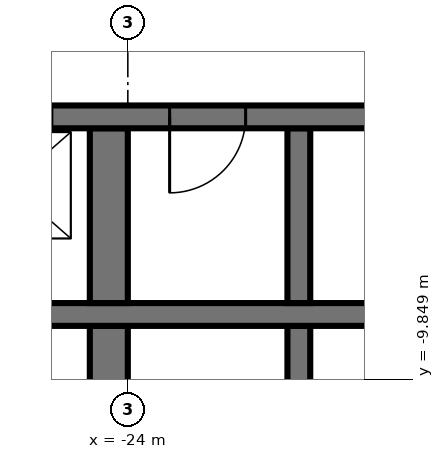
"""IFC4 building model, lengths in metres.
Left out: names, types, materials, properties, quantities, classifications, styles, units other than length and angle.
Written with IfcOpenShell. Run it as: python <this file> out.ifc"""

import sys

from ifc_helpers import new_model, si_unit, direction, frame, frame_2d, origin, place, context, subcontext, project, spatial, rectangle, extrude, element, fill, save


model = new_model("IFC4")
c1 = context("Model", 3, precision=1e-05, world=origin(), true_north=direction((0.0, 1.0)))
c2 = subcontext(c1, "Body", "Model", "MODEL_VIEW")
j1 = project(units=[si_unit("LENGTHUNIT", "METRE"), si_unit("PLANEANGLEUNIT", "RADIAN")], contexts=[c1])
p1 = place(None, origin())
s1 = spatial("IfcSite", under=j1, at=p1, CompositionType="ELEMENT")
p2 = place(p1, origin())
s2 = spatial("IfcBuilding", under=s1, at=p2, CompositionType="ELEMENT")
p3 = place(p2, frame((0.0, 0.0, 45.6)))
s3 = spatial("IfcBuildingStorey", under=s2, at=p3, CompositionType="ELEMENT", Elevation=45.6)
p4 = place(p3, frame((-29.05, -6.4, 0.0), z_axis=(0.0, 0.0, 1.0), x_axis=(1.0, 0.0, 0.0)))
e1 = element("IfcWall", 1, at=p4, inside=s3, PredefinedType="SHEAR", context=c2, shape_type="SweptSolid", body=[
    extrude(rectangle(XDim=18.7, YDim=0.3, at=frame_2d((9.35, 0.0))), origin(), (0.0, 0.0, 1.0), 3.6),
])
p5 = place(p4, frame((2.95, 0.0, 0.0)))
e2 = element("IfcOpeningElement", 2, at=p5, cuts=e1, PredefinedType="OPENING", context=c2, shape_type="SweptSolid", body=[
    extrude(rectangle(XDim=1.1, YDim=2.1, at=frame_2d((0.55, 1.05))), frame((0.0, 0.16, 0.0), z_axis=(0.0, -1.0, 0.0), x_axis=(1.0, 0.0, 0.0)), (0.0, 0.0, 1.0), 0.32),
])
p6 = place(p4, frame((0.55, 0.0, 0.0)))
e3 = element("IfcOpeningElement", 3, at=p6, cuts=e1, PredefinedType="OPENING", context=c2, shape_type="SweptSolid", body=[
    extrude(rectangle(XDim=1.1, YDim=2.1, at=frame_2d((0.55, 1.05))), frame((0.0, 0.16, 0.0), z_axis=(0.0, -1.0, 0.0), x_axis=(1.0, 0.0, 0.0)), (0.0, 0.0, 1.0), 0.32),
])
p7 = place(p4, frame((10.8, 0.0, 0.0)))
e4 = element("IfcOpeningElement", 4, at=p7, cuts=e1, PredefinedType="OPENING", context=c2, shape_type="SweptSolid", body=[
    extrude(rectangle(XDim=1.1, YDim=2.1, at=frame_2d((0.55, 1.05))), frame((0.0, 0.16, 0.0), z_axis=(0.0, -1.0, 0.0), x_axis=(1.0, 0.0, 0.0)), (0.0, 0.0, 1.0), 0.32),
])
p8 = place(p4, frame((5.6, 0.0, 0.0)))
e5 = element("IfcOpeningElement", 5, at=p8, cuts=e1, PredefinedType="OPENING", context=c2, shape_type="SweptSolid", body=[
    extrude(rectangle(XDim=1.0, YDim=2.1, at=frame_2d((0.5, 1.05))), frame((0.0, 0.16, 0.0), z_axis=(0.0, -1.0, 0.0), x_axis=(1.0, 0.0, 0.0)), (0.0, 0.0, 1.0), 0.32),
])
p9 = place(p3, frame((-29.05, -9.0, 0.0), z_axis=(0.0, 0.0, 1.0), x_axis=(1.0, 0.0, 0.0)))
e6 = element("IfcWall", 6, at=p9, inside=s3, PredefinedType="SHEAR", context=c2, shape_type="SweptSolid", body=[
    extrude(rectangle(XDim=18.7, YDim=0.3, at=frame_2d((9.35, 0.0))), origin(), (0.0, 0.0, 1.0), 3.6),
])
p10 = place(p9, frame((13.8, 0.0, 0.0)))
e7 = element("IfcOpeningElement", 7, at=p10, cuts=e6, PredefinedType="OPENING", context=c2, shape_type="SweptSolid", body=[
    extrude(rectangle(XDim=1.1, YDim=2.1, at=frame_2d((0.55, 1.05))), frame((0.0, 0.16, 0.0), z_axis=(0.0, -1.0, 0.0), x_axis=(1.0, 0.0, 0.0)), (0.0, 0.0, 1.0), 0.32),
])
p11 = place(p3, frame((-21.75, -8.85, 0.0), z_axis=(0.0, 0.0, 1.0), x_axis=(0.0, 1.0, 0.0)))
e8 = element("IfcWall", 8, at=p11, inside=s3, PredefinedType="SHEAR", context=c2, shape_type="SweptSolid", body=[
    extrude(rectangle(XDim=2.3, YDim=0.3, at=frame_2d((1.15, 0.0))), origin(), (0.0, 0.0, 1.0), 3.6),
])
p12 = place(p3, frame((-21.75, -14.55, 0.0), z_axis=(0.0, 0.0, 1.0), x_axis=(0.0, 1.0, 0.0)))
e9 = element("IfcWall", 9, at=p12, inside=s3, PredefinedType="SHEAR", context=c2, shape_type="SweptSolid", body=[
    extrude(rectangle(XDim=5.4, YDim=0.3, at=frame_2d((2.7, 0.0))), origin(), (0.0, 0.0, 1.0), 3.6),
])
p13 = place(p3, frame((-24.25, -8.85, 0.0), z_axis=(0.0, 0.0, 1.0), x_axis=(0.0, 1.0, 0.0)))
e10 = element("IfcWall", 10, at=p13, inside=s3, PredefinedType="SHEAR", context=c2, shape_type="SweptSolid", body=[
    extrude(rectangle(XDim=2.3, YDim=0.5, at=frame_2d((1.15, 0.0))), origin(), (0.0, 0.0, 1.0), 3.6),
])
p14 = place(p3, frame((-24.25, -14.55, 0.0), z_axis=(0.0, 0.0, 1.0), x_axis=(0.0, 1.0, 0.0)))
e11 = element("IfcWall", 11, at=p14, inside=s3, PredefinedType="SHEAR", context=c2, shape_type="SweptSolid", body=[
    extrude(rectangle(XDim=5.4, YDim=0.5, at=frame_2d((2.7, 0.0))), origin(), (0.0, 0.0, 1.0), 3.6),
])
p15 = place(p8, frame((0.5, 0.0, 0.0), z_axis=(0.0, 0.0, 1.0), x_axis=(-1.0, 0.0, 0.0)))
e12 = element("IfcDoor", 12, at=p15, inside=s3, OperationType="SINGLE_SWING_LEFT", PredefinedType="DOOR", context=c2, shape_type="SweptSolid", body=[
    extrude(rectangle(XDim=1.0, YDim=2.1, at=frame_2d((0.0, 1.05))), frame((0.0, -0.025, 0.0), z_axis=(0.0, 1.0, 0.0), x_axis=(-1.0, 0.0, 0.0)), (0.0, 0.0, 1.0), 0.05),
])
fill(e5, e12)
save(model, sys.argv[1])
